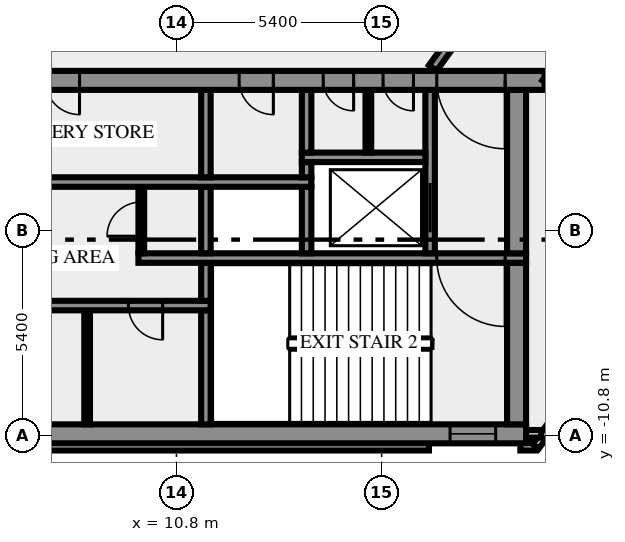
"""IFC4 building model, lengths in metres.
Left out: names, types, materials, properties, quantities, classifications, styles, units other than length and angle.
Written with IfcOpenShell. Run it as: python <this file> out.ifc"""

import sys

from ifc_helpers import new_model, si_unit, direction, frame, frame_2d, origin, place, context, subcontext, project, spatial, rectangle, extrude, element, fill, save


model = new_model("IFC4")
c1 = context("Model", 3, precision=1e-05, world=origin(), true_north=direction((0.0, 1.0)))
c2 = subcontext(c1, "Body", "Model", "MODEL_VIEW")
j1 = project(units=[si_unit("LENGTHUNIT", "METRE"), si_unit("PLANEANGLEUNIT", "RADIAN")], contexts=[c1])
p1 = place(None, origin())
s1 = spatial("IfcSite", under=j1, at=p1, CompositionType="ELEMENT")
p2 = place(p1, origin())
s2 = spatial("IfcBuilding", under=s1, at=p2, CompositionType="ELEMENT")
p3 = place(p2, frame((0.0, 0.0, 311.0)))
s3 = spatial("IfcBuildingStorey", under=s2, at=p3, CompositionType="ELEMENT", Elevation=311.0)
p4 = place(p3, frame((-17.444, -11.088, 0.0), z_axis=(0.0, 0.0, 1.0), x_axis=(1.0, 0.0, 0.0)))
e1 = element("IfcWall", 1, at=p4, inside=s3, PredefinedType="SOLIDWALL", context=c2, shape_type="SweptSolid", body=[
    extrude(rectangle(XDim=34.888, YDim=0.2, at=frame_2d((17.444, 0.0))), origin(), (0.0, 0.0, 1.0), 3.65),
])
p5 = place(p3, frame((19.85, -11.088, 0.0), z_axis=(0.0, 0.0, 1.0), x_axis=(1.0, 0.0, 0.0)))
e2 = element("IfcWall", 2, at=p5, inside=s3, PredefinedType="SOLIDWALL", context=c2, shape_type="SweptSolid", body=[
    extrude(rectangle(XDim=0.406, YDim=0.2, at=frame_2d((0.203, 0.0))), origin(), (0.0, 0.0, 1.0), 3.65),
])
p6 = place(p3, frame((20.253, -11.083, 0.0), z_axis=(0.0, 0.0, 1.0), x_axis=(0.587766567315, 0.809030569476, 0.0)))
e3 = element("IfcWall", 3, at=p6, inside=s3, PredefinedType="SOLIDWALL", context=c2, shape_type="SweptSolid", body=[
    extrude(rectangle(XDim=2.688, YDim=0.2, at=frame_2d((1.344, 0.0))), origin(), (0.0, 0.0, 1.0), 3.65),
])
p7 = place(p3, frame((19.98, -10.75, 0.0), z_axis=(0.0, 0.0, 1.0), x_axis=(1.0, 0.0, 0.0)))
e4 = element("IfcWall", 4, at=p7, inside=s3, PredefinedType="SOLIDWALL", context=c2, shape_type="SweptSolid", body=[
    extrude(rectangle(XDim=0.417, YDim=0.2, at=frame_2d((0.208, 0.0))), origin(), (0.0, 0.0, 1.0), 3.65),
])
p8 = place(p3, frame((-20.0, -10.75, 0.0), z_axis=(0.0, 0.0, 1.0), x_axis=(1.0, 0.0, 0.0)))
e5 = element("IfcWall", 5, at=p8, inside=s3, PredefinedType="SHEAR", context=c2, shape_type="SweptSolid", body=[
    extrude(rectangle(XDim=40.0, YDim=0.5, at=frame_2d((20.0, 0.0))), origin(), (0.0, 0.0, 1.0), 3.65),
])
p9 = place(p8, frame((0.8, 0.0, 1.0)))
e6 = element("IfcOpeningElement", 6, at=p9, cuts=e5, PredefinedType="OPENING", context=c2, shape_type="SweptSolid", body=[
    extrude(rectangle(XDim=1.2, YDim=1.2, at=frame_2d((0.6, 0.6))), frame((0.0, 0.26, 0.0), z_axis=(0.0, -1.0, 0.0), x_axis=(1.0, 0.0, 0.0)), (0.0, 0.0, 1.0), 0.52),
])
p10 = place(p8, frame((38.0, 0.0, 1.0)))
e7 = element("IfcOpeningElement", 7, at=p10, cuts=e5, PredefinedType="OPENING", context=c2, shape_type="SweptSolid", body=[
    extrude(rectangle(XDim=1.2, YDim=1.2, at=frame_2d((0.6, 0.6))), frame((0.0, 0.26, 0.0), z_axis=(0.0, -1.0, 0.0), x_axis=(1.0, 0.0, 0.0)), (0.0, 0.0, 1.0), 0.52),
])
p11 = place(p3, frame((8.45, -10.5, 0.0), z_axis=(0.0, 0.0, 1.0), x_axis=(0.0, 1.0, 0.0)))
e8 = element("IfcWall", 8, at=p11, inside=s3, PredefinedType="PARTITIONING", context=c2, shape_type="SweptSolid", body=[
    extrude(rectangle(XDim=3.0, YDim=0.15, at=frame_2d((1.5, 0.0))), origin(), (0.0, 0.0, 1.0), 3.65),
])
p12 = place(p3, frame((11.575, -10.5, 0.0), z_axis=(0.0, 0.0, 1.0), x_axis=(0.0, 1.0, 0.0)))
e9 = element("IfcWall", 9, at=p12, inside=s3, PredefinedType="SHEAR", context=c2, shape_type="SweptSolid", body=[
    extrude(rectangle(XDim=3.0, YDim=0.25, at=frame_2d((1.5, 0.0))), origin(), (0.0, 0.0, 1.0), 3.65),
])
p13 = place(p3, frame((19.75, -10.5, 0.0), z_axis=(0.0, 0.0, 1.0), x_axis=(0.0, 1.0, 0.0)))
e10 = element("IfcWall", 10, at=p13, inside=s3, PredefinedType="SHEAR", context=c2, shape_type="SweptSolid", body=[
    extrude(rectangle(XDim=4.25, YDim=0.5, at=frame_2d((2.125, 0.0))), origin(), (0.0, 0.0, 1.0), 3.65),
])
p14 = place(p3, frame((11.7, -7.375, 0.0), z_axis=(0.0, 0.0, 1.0), x_axis=(-1.0, 0.0, 0.0)))
e11 = element("IfcWall", 11, at=p14, inside=s3, PredefinedType="SHEAR", context=c2, shape_type="SweptSolid", body=[
    extrude(rectangle(XDim=23.4, YDim=0.25, at=frame_2d((11.7, 0.0))), origin(), (0.0, 0.0, 1.0), 3.65),
])
p15 = place(p14, frame((22.225, 0.0, 0.0)))
e12 = element("IfcOpeningElement", 12, at=p15, cuts=e11, PredefinedType="OPENING", context=c2, shape_type="SweptSolid", body=[
    extrude(rectangle(XDim=0.8, YDim=2.1, at=frame_2d((0.4, 1.05))), frame((0.0, 0.135, 0.0), z_axis=(0.0, -1.0, 0.0), x_axis=(1.0, 0.0, 0.0)), (0.0, 0.0, 1.0), 0.27),
])
p16 = place(p14, frame((20.2, 0.0, 0.0)))
e13 = element("IfcOpeningElement", 13, at=p16, cuts=e11, PredefinedType="OPENING", context=c2, shape_type="SweptSolid", body=[
    extrude(rectangle(XDim=1.1, YDim=2.1, at=frame_2d((0.55, 1.05))), frame((0.0, 0.135, 0.0), z_axis=(0.0, -1.0, 0.0), x_axis=(1.0, 0.0, 0.0)), (0.0, 0.0, 1.0), 0.27),
])
p17 = place(p14, frame((17.7, 0.0, 0.0)))
e14 = element("IfcOpeningElement", 14, at=p17, cuts=e11, PredefinedType="OPENING", context=c2, shape_type="SweptSolid", body=[
    extrude(rectangle(XDim=1.1, YDim=2.1, at=frame_2d((0.55, 1.05))), frame((0.0, 0.135, 0.0), z_axis=(0.0, -1.0, 0.0), x_axis=(1.0, 0.0, 0.0)), (0.0, 0.0, 1.0), 0.27),
])
p18 = place(p14, frame((15.975, 0.0, 0.0)))
e15 = element("IfcOpeningElement", 15, at=p18, cuts=e11, PredefinedType="OPENING", context=c2, shape_type="SweptSolid", body=[
    extrude(rectangle(XDim=0.8, YDim=2.1, at=frame_2d((0.4, 1.05))), frame((0.0, 0.135, 0.0), z_axis=(0.0, -1.0, 0.0), x_axis=(1.0, 0.0, 0.0)), (0.0, 0.0, 1.0), 0.27),
])
p19 = place(p14, frame((14.65, 0.0, 0.0)))
e16 = element("IfcOpeningElement", 16, at=p19, cuts=e11, PredefinedType="OPENING", context=c2, shape_type="SweptSolid", body=[
    extrude(rectangle(XDim=0.8, YDim=2.1, at=frame_2d((0.4, 1.05))), frame((0.0, 0.135, 0.0), z_axis=(0.0, -1.0, 0.0), x_axis=(1.0, 0.0, 0.0)), (0.0, 0.0, 1.0), 0.27),
])
p20 = place(p14, frame((12.8, 0.0, 0.0)))
e17 = element("IfcOpeningElement", 17, at=p20, cuts=e11, PredefinedType="OPENING", context=c2, shape_type="SweptSolid", body=[
    extrude(rectangle(XDim=0.9, YDim=2.1, at=frame_2d((0.45, 1.05))), frame((0.0, 0.135, 0.0), z_axis=(0.0, -1.0, 0.0), x_axis=(1.0, 0.0, 0.0)), (0.0, 0.0, 1.0), 0.27),
])
p21 = place(p14, frame((10.7, 0.0, 0.0)))
e18 = element("IfcOpeningElement", 18, at=p21, cuts=e11, PredefinedType="OPENING", context=c2, shape_type="SweptSolid", body=[
    extrude(rectangle(XDim=0.9, YDim=2.1, at=frame_2d((0.45, 1.05))), frame((0.0, 0.135, 0.0), z_axis=(0.0, -1.0, 0.0), x_axis=(1.0, 0.0, 0.0)), (0.0, 0.0, 1.0), 0.27),
])
p22 = place(p14, frame((6.237, 0.0, 0.0)))
e19 = element("IfcOpeningElement", 19, at=p22, cuts=e11, PredefinedType="OPENING", context=c2, shape_type="SweptSolid", body=[
    extrude(rectangle(XDim=0.9, YDim=2.1, at=frame_2d((0.45, 1.05))), frame((0.0, 0.135, 0.0), z_axis=(0.0, -1.0, 0.0), x_axis=(1.0, 0.0, 0.0)), (0.0, 0.0, 1.0), 0.27),
])
p23 = place(p14, frame((1.263, 0.0, 0.0)))
e20 = element("IfcOpeningElement", 20, at=p23, cuts=e11, PredefinedType="OPENING", context=c2, shape_type="SweptSolid", body=[
    extrude(rectangle(XDim=0.9, YDim=2.1, at=frame_2d((0.45, 1.05))), frame((0.0, 0.135, 0.0), z_axis=(0.0, -1.0, 0.0), x_axis=(1.0, 0.0, 0.0)), (0.0, 0.0, 1.0), 0.27),
])
p24 = place(p3, frame((11.575, -7.25, 0.0), z_axis=(0.0, 0.0, 1.0), x_axis=(0.0, 1.0, 0.0)))
e21 = element("IfcWall", 21, at=p24, inside=s3, PredefinedType="SHEAR", context=c2, shape_type="SweptSolid", body=[
    extrude(rectangle(XDim=1.0, YDim=0.25, at=frame_2d((0.5, 0.0))), origin(), (0.0, 0.0, 1.0), 3.65),
])
p25 = place(p3, frame((20.0, -6.125, 0.0), z_axis=(0.0, 0.0, 1.0), x_axis=(-1.0, 0.0, 0.0)))
e22 = element("IfcWall", 22, at=p25, inside=s3, PredefinedType="SHEAR", context=c2, shape_type="SweptSolid", body=[
    extrude(rectangle(XDim=10.2, YDim=0.25, at=frame_2d((5.1, 0.0))), origin(), (0.0, 0.0, 1.0), 3.65),
])
p26 = place(p25, frame((0.55, 0.0, 0.0)))
e23 = element("IfcOpeningElement", 23, at=p26, cuts=e22, PredefinedType="OPENING", context=c2, shape_type="SweptSolid", body=[
    extrude(rectangle(XDim=1.8, YDim=2.1, at=frame_2d((0.9, 1.05))), frame((0.0, 0.135, 0.0), z_axis=(0.0, -1.0, 0.0), x_axis=(1.0, 0.0, 0.0)), (0.0, 0.0, 1.0), 0.27),
])
p27 = place(p3, frame((9.875, -6.0, 0.0), z_axis=(0.0, 0.0, 1.0), x_axis=(0.0, 1.0, 0.0)))
e24 = element("IfcWall", 24, at=p27, inside=s3, PredefinedType="PARTITIONING", context=c2, shape_type="SweptSolid", body=[
    extrude(rectangle(XDim=1.75, YDim=0.15, at=frame_2d((0.875, 0.0))), origin(), (0.0, 0.0, 1.0), 3.65),
])
p28 = place(p27, frame((0.45, 0.0, 0.0)))
e25 = element("IfcOpeningElement", 25, at=p28, cuts=e24, PredefinedType="OPENING", context=c2, shape_type="SweptSolid", body=[
    extrude(rectangle(XDim=0.9, YDim=2.1, at=frame_2d((0.45, 1.05))), frame((0.0, 0.085, 0.0), z_axis=(0.0, -1.0, 0.0), x_axis=(1.0, 0.0, 0.0)), (0.0, 0.0, 1.0), 0.17),
])
for number, where, z_axis, x_axis in (
    (26, (11.575, -6.0, 0.0), (0.0, 0.0, 1.0), (0.0, 1.0, 0.0)),
    (27, (14.225, -6.0, 0.0), (0.0, 0.0, 1.0), (0.0, 1.0, 0.0)),
):
    element("IfcWall", number, at=place(p3, frame(where, z_axis=z_axis, x_axis=x_axis)), inside=s3, PredefinedType="SHEAR", context=c2, shape_type="SweptSolid", body=[
        extrude(rectangle(XDim=1.75, YDim=0.25, at=frame_2d((0.875, 0.0))), origin(), (0.0, 0.0, 1.0), 3.65),
    ])
p29 = place(p3, frame((17.475, -6.0, 0.0), z_axis=(0.0, 0.0, 1.0), x_axis=(0.0, 1.0, 0.0)))
e28 = element("IfcWall", 28, at=p29, inside=s3, PredefinedType="SHEAR", context=c2, shape_type="SweptSolid", body=[
    extrude(rectangle(XDim=4.3, YDim=0.25, at=frame_2d((2.15, 0.0))), origin(), (0.0, 0.0, 1.0), 3.65),
])
p30 = place(p29, frame((0.55, 0.0, 0.0)))
e29 = element("IfcOpeningElement", 29, at=p30, cuts=e28, PredefinedType="OPENING", context=c2, shape_type="SweptSolid", body=[
    extrude(rectangle(XDim=1.3, YDim=2.1, at=frame_2d((0.65, 1.05))), frame((0.0, 0.135, 0.0), z_axis=(0.0, -1.0, 0.0), x_axis=(1.0, 0.0, 0.0)), (0.0, 0.0, 1.0), 0.27),
])
p31 = place(p3, frame((19.75, -6.0, 0.0), z_axis=(0.0, 0.0, 1.0), x_axis=(0.0, 1.0, 0.0)))
e30 = element("IfcWall", 30, at=p31, inside=s3, PredefinedType="SHEAR", context=c2, shape_type="SweptSolid", body=[
    extrude(rectangle(XDim=4.3, YDim=0.5, at=frame_2d((2.15, 0.0))), origin(), (0.0, 0.0, 1.0), 3.65),
])
p32 = place(p3, frame((-0.6, -4.125, 0.0), z_axis=(0.0, 0.0, 1.0), x_axis=(1.0, 0.0, 0.0)))
e31 = element("IfcWall", 31, at=p32, inside=s3, PredefinedType="SHEAR", context=c2, shape_type="SweptSolid", body=[
    extrude(rectangle(XDim=14.95, YDim=0.25, at=frame_2d((7.475, 0.0))), origin(), (0.0, 0.0, 1.0), 3.65),
])
p33 = place(p32, frame((2.75, 0.0, 0.0)))
e32 = element("IfcOpeningElement", 32, at=p33, cuts=e31, PredefinedType="OPENING", context=c2, shape_type="SweptSolid", body=[
    extrude(rectangle(XDim=1.3, YDim=2.1, at=frame_2d((0.65, 1.05))), frame((0.0, 0.135, 0.0), z_axis=(0.0, -1.0, 0.0), x_axis=(1.0, 0.0, 0.0)), (0.0, 0.0, 1.0), 0.27),
])
p34 = place(p3, frame((11.575, -4.0, 0.0), z_axis=(0.0, 0.0, 1.0), x_axis=(0.0, 1.0, 0.0)))
e33 = element("IfcWall", 33, at=p34, inside=s3, PredefinedType="SHEAR", context=c2, shape_type="SweptSolid", body=[
    extrude(rectangle(XDim=2.3, YDim=0.25, at=frame_2d((1.15, 0.0))), origin(), (0.0, 0.0, 1.0), 3.65),
])
p35 = place(p3, frame((14.225, -4.0, 0.0), z_axis=(0.0, 0.0, 1.0), x_axis=(0.0, 1.0, 0.0)))
e34 = element("IfcWall", 34, at=p35, inside=s3, PredefinedType="SHEAR", context=c2, shape_type="SweptSolid", body=[
    extrude(rectangle(XDim=0.4, YDim=0.25, at=frame_2d((0.2, 0.0))), origin(), (0.0, 0.0, 1.0), 3.65),
])
p36 = place(p3, frame((14.1, -3.475, 0.0), z_axis=(0.0, 0.0, 1.0), x_axis=(1.0, 0.0, 0.0)))
e35 = element("IfcWall", 35, at=p36, inside=s3, PredefinedType="SHEAR", context=c2, shape_type="SweptSolid", body=[
    extrude(rectangle(XDim=3.25, YDim=0.25, at=frame_2d((1.625, 0.0))), origin(), (0.0, 0.0, 1.0), 3.65),
])
p37 = place(p3, frame((14.225, -3.35, 0.0), z_axis=(0.0, 0.0, 1.0), x_axis=(0.0, 1.0, 0.0)))
e36 = element("IfcWall", 36, at=p37, inside=s3, PredefinedType="SHEAR", context=c2, shape_type="SweptSolid", body=[
    extrude(rectangle(XDim=1.65, YDim=0.25, at=frame_2d((0.825, 0.0))), origin(), (0.0, 0.0, 1.0), 3.65),
])
p38 = place(p3, frame((15.85, -3.35, 0.0), z_axis=(0.0, 0.0, 1.0), x_axis=(0.0, 1.0, 0.0)))
e37 = element("IfcWall", 37, at=p38, inside=s3, PredefinedType="PARTITIONING", context=c2, shape_type="SweptSolid", body=[
    extrude(rectangle(XDim=1.65, YDim=0.15, at=frame_2d((0.825, 0.0))), origin(), (0.0, 0.0, 1.0), 3.65),
])
p39 = place(p3, frame((20.49, -1.45, 0.0), z_axis=(0.0, 0.0, 1.0), x_axis=(-1.0, 0.0, 0.0)))
e38 = element("IfcWall", 38, at=p39, inside=s3, PredefinedType="SHEAR", context=c2, shape_type="SweptSolid", body=[
    extrude(rectangle(XDim=40.98, YDim=0.5, at=frame_2d((20.49, 0.0))), origin(), (0.0, 0.0, 1.0), 3.65),
])
p40 = place(p39, frame((38.14, 0.0, 0.0)))
e39 = element("IfcOpeningElement", 39, at=p40, cuts=e38, PredefinedType="OPENING", context=c2, shape_type="SweptSolid", body=[
    extrude(rectangle(XDim=1.8, YDim=2.1, at=frame_2d((0.9, 1.05))), frame((0.0, 0.26, 0.0), z_axis=(0.0, -1.0, 0.0), x_axis=(1.0, 0.0, 0.0)), (0.0, 0.0, 1.0), 0.52),
])
p41 = place(p39, frame((35.89, 0.0, 0.0)))
e40 = element("IfcOpeningElement", 40, at=p41, cuts=e38, PredefinedType="OPENING", context=c2, shape_type="SweptSolid", body=[
    extrude(rectangle(XDim=0.9, YDim=2.1, at=frame_2d((0.45, 1.05))), frame((0.0, 0.26, 0.0), z_axis=(0.0, -1.0, 0.0), x_axis=(1.0, 0.0, 0.0)), (0.0, 0.0, 1.0), 0.52),
])
p42 = place(p39, frame((32.94, 0.0, 0.0)))
e41 = element("IfcOpeningElement", 41, at=p42, cuts=e38, PredefinedType="OPENING", context=c2, shape_type="SweptSolid", body=[
    extrude(rectangle(XDim=0.9, YDim=2.1, at=frame_2d((0.45, 1.05))), frame((0.0, 0.26, 0.0), z_axis=(0.0, -1.0, 0.0), x_axis=(1.0, 0.0, 0.0)), (0.0, 0.0, 1.0), 0.52),
])
p43 = place(p39, frame((31.015, 0.0, 0.0)))
e42 = element("IfcOpeningElement", 42, at=p43, cuts=e38, PredefinedType="OPENING", context=c2, shape_type="SweptSolid", body=[
    extrude(rectangle(XDim=0.8, YDim=2.1, at=frame_2d((0.4, 1.05))), frame((0.0, 0.26, 0.0), z_axis=(0.0, -1.0, 0.0), x_axis=(1.0, 0.0, 0.0)), (0.0, 0.0, 1.0), 0.52),
])
p44 = place(p39, frame((24.765, 0.0, 0.0)))
e43 = element("IfcOpeningElement", 43, at=p44, cuts=e38, PredefinedType="OPENING", context=c2, shape_type="SweptSolid", body=[
    extrude(rectangle(XDim=0.8, YDim=2.1, at=frame_2d((0.4, 1.05))), frame((0.0, 0.26, 0.0), z_axis=(0.0, -1.0, 0.0), x_axis=(1.0, 0.0, 0.0)), (0.0, 0.0, 1.0), 0.52),
])
p45 = place(p39, frame((21.765, 0.0, 0.0)))
e44 = element("IfcOpeningElement", 44, at=p45, cuts=e38, PredefinedType="OPENING", context=c2, shape_type="SweptSolid", body=[
    extrude(rectangle(XDim=2.0, YDim=2.1, at=frame_2d((1.0, 1.05))), frame((0.0, 0.26, 0.0), z_axis=(0.0, -1.0, 0.0), x_axis=(1.0, 0.0, 0.0)), (0.0, 0.0, 1.0), 0.52),
])
p46 = place(p39, frame((12.24, 0.0, 0.0)))
e45 = element("IfcOpeningElement", 45, at=p46, cuts=e38, PredefinedType="OPENING", context=c2, shape_type="SweptSolid", body=[
    extrude(rectangle(XDim=0.9, YDim=2.1, at=frame_2d((0.45, 1.05))), frame((0.0, 0.26, 0.0), z_axis=(0.0, -1.0, 0.0), x_axis=(1.0, 0.0, 0.0)), (0.0, 0.0, 1.0), 0.52),
])
p47 = place(p39, frame((7.14, 0.0, 0.0)))
e46 = element("IfcOpeningElement", 46, at=p47, cuts=e38, PredefinedType="OPENING", context=c2, shape_type="SweptSolid", body=[
    extrude(rectangle(XDim=0.9, YDim=2.1, at=frame_2d((0.45, 1.05))), frame((0.0, 0.26, 0.0), z_axis=(0.0, -1.0, 0.0), x_axis=(1.0, 0.0, 0.0)), (0.0, 0.0, 1.0), 0.52),
])
p48 = place(p39, frame((5.028, 0.0, 0.0)))
e47 = element("IfcOpeningElement", 47, at=p48, cuts=e38, PredefinedType="OPENING", context=c2, shape_type="SweptSolid", body=[
    extrude(rectangle(XDim=0.8, YDim=2.1, at=frame_2d((0.4, 1.05))), frame((0.0, 0.26, 0.0), z_axis=(0.0, -1.0, 0.0), x_axis=(1.0, 0.0, 0.0)), (0.0, 0.0, 1.0), 0.52),
])
p49 = place(p39, frame((3.452, 0.0, 0.0)))
e48 = element("IfcOpeningElement", 48, at=p49, cuts=e38, PredefinedType="OPENING", context=c2, shape_type="SweptSolid", body=[
    extrude(rectangle(XDim=0.8, YDim=2.1, at=frame_2d((0.4, 1.05))), frame((0.0, 0.26, 0.0), z_axis=(0.0, -1.0, 0.0), x_axis=(1.0, 0.0, 0.0)), (0.0, 0.0, 1.0), 0.52),
])
p50 = place(p39, frame((1.04, 0.0, 0.0)))
e49 = element("IfcOpeningElement", 49, at=p50, cuts=e38, PredefinedType="OPENING", context=c2, shape_type="SweptSolid", body=[
    extrude(rectangle(XDim=1.8, YDim=2.1, at=frame_2d((0.9, 1.05))), frame((0.0, 0.26, 0.0), z_axis=(0.0, -1.0, 0.0), x_axis=(1.0, 0.0, 0.0)), (0.0, 0.0, 1.0), 0.52),
])
p51 = place(p3, frame((17.545, -1.125, 0.0), z_axis=(0.0, 0.0, 1.0), x_axis=(0.587796810203, 0.809008596935, 0.0)))
e50 = element("IfcWall", 50, at=p51, inside=s3, PredefinedType="SOLIDWALL", context=c2, shape_type="SweptSolid", body=[
    extrude(rectangle(XDim=12.703, YDim=0.25, at=frame_2d((6.352, 0.0))), origin(), (0.0, 0.0, 1.0), 3.65),
])
p52 = place(p51, frame((11.329, 0.0, 0.0)))
e51 = element("IfcOpeningElement", 51, at=p52, cuts=e50, PredefinedType="OPENING", context=c2, shape_type="SweptSolid", body=[
    extrude(rectangle(XDim=0.9, YDim=2.1, at=frame_2d((0.45, 1.05))), frame((0.0, 0.135, 0.0), z_axis=(0.0, -1.0, 0.0), x_axis=(1.0, 0.0, 0.0)), (0.0, 0.0, 1.0), 0.27),
])
p53 = place(p3, frame((27.009, 7.392, 0.0), z_axis=(0.0, 0.0, 1.0), x_axis=(-0.587776457057, -0.809023384414, 0.0)))
e52 = element("IfcWall", 52, at=p53, inside=s3, PredefinedType="SOLIDWALL", context=c2, shape_type="SweptSolid", body=[
    extrude(rectangle(XDim=11.021, YDim=0.25, at=frame_2d((5.51, 0.0))), origin(), (0.0, 0.0, 1.0), 3.65),
])
p54 = place(p53, frame((9.588, 0.0, 0.0)))
e53 = element("IfcOpeningElement", 53, at=p54, cuts=e52, PredefinedType="OPENING", context=c2, shape_type="SweptSolid", body=[
    extrude(rectangle(XDim=0.9, YDim=2.1, at=frame_2d((0.45, 1.05))), frame((0.0, 0.135, 0.0), z_axis=(0.0, -1.0, 0.0), x_axis=(1.0, 0.0, 0.0)), (0.0, 0.0, 1.0), 0.27),
])
p55 = place(p10, origin())
e54 = element("IfcWindow", 54, at=p55, inside=s3, PartitioningType="SINGLE_PANEL", PredefinedType="WINDOW", context=c2, shape_type="SweptSolid", body=[
    extrude(rectangle(XDim=1.2, YDim=1.2, at=frame_2d((0.6, 0.6))), frame((0.0, 0.03, 0.0), z_axis=(0.0, -1.0, 0.0), x_axis=(1.0, 0.0, 0.0)), (0.0, 0.0, 1.0), 0.06),
])
fill(e7, e54)
p56 = place(p23, origin())
e55 = element("IfcDoor", 55, at=p56, inside=s3, OperationType="SINGLE_SWING_LEFT", PredefinedType="DOOR", context=c2, shape_type="SweptSolid", body=[
    extrude(rectangle(XDim=0.9, YDim=2.1, at=frame_2d((0.45, 1.05))), frame((0.0, 0.025, 0.0), z_axis=(0.0, -1.0, 0.0), x_axis=(1.0, 0.0, 0.0)), (0.0, 0.0, 1.0), 0.05),
])
fill(e20, e55)
p57 = place(p26, origin())
e56 = element("IfcDoor", 56, at=p57, inside=s3, OperationType="DOUBLE_DOOR_SINGLE_SWING", PredefinedType="DOOR", context=c2, shape_type="SweptSolid", body=[
    extrude(rectangle(XDim=1.8, YDim=2.1, at=frame_2d((0.9, 1.05))), frame((0.0, 0.025, 0.0), z_axis=(0.0, -1.0, 0.0), x_axis=(1.0, 0.0, 0.0)), (0.0, 0.0, 1.0), 0.05),
])
fill(e23, e56)
p58 = place(p28, origin())
e57 = element("IfcDoor", 57, at=p58, inside=s3, OperationType="SINGLE_SWING_RIGHT", PredefinedType="DOOR", context=c2, shape_type="SweptSolid", body=[
    extrude(rectangle(XDim=0.9, YDim=2.1, at=frame_2d((0.45, 1.05))), frame((0.0, 0.025, 0.0), z_axis=(0.0, -1.0, 0.0), x_axis=(1.0, 0.0, 0.0)), (0.0, 0.0, 1.0), 0.05),
])
fill(e25, e57)
p59 = place(p30, origin())
e58 = element("IfcDoor", 58, at=p59, inside=s3, OperationType="DOUBLE_DOOR_SLIDING", PredefinedType="DOOR", context=c2, shape_type="SweptSolid", body=[
    extrude(rectangle(XDim=1.3, YDim=2.1, at=frame_2d((0.65, 1.05))), frame((0.0, 0.025, 0.0), z_axis=(0.0, -1.0, 0.0), x_axis=(1.0, 0.0, 0.0)), (0.0, 0.0, 1.0), 0.05),
])
fill(e29, e58)
p60 = place(p46, origin())
e59 = element("IfcDoor", 59, at=p60, inside=s3, OperationType="SINGLE_SWING_LEFT", PredefinedType="DOOR", context=c2, shape_type="SweptSolid", body=[
    extrude(rectangle(XDim=0.9, YDim=2.1, at=frame_2d((0.45, 1.05))), frame((0.0, 0.025, 0.0), z_axis=(0.0, -1.0, 0.0), x_axis=(1.0, 0.0, 0.0)), (0.0, 0.0, 1.0), 0.05),
])
fill(e45, e59)
p61 = place(p47, origin())
e60 = element("IfcDoor", 60, at=p61, inside=s3, OperationType="SINGLE_SWING_LEFT", PredefinedType="DOOR", context=c2, shape_type="SweptSolid", body=[
    extrude(rectangle(XDim=0.9, YDim=2.1, at=frame_2d((0.45, 1.05))), frame((0.0, 0.025, 0.0), z_axis=(0.0, -1.0, 0.0), x_axis=(1.0, 0.0, 0.0)), (0.0, 0.0, 1.0), 0.05),
])
fill(e46, e60)
p62 = place(p48, origin())
e61 = element("IfcDoor", 61, at=p62, inside=s3, OperationType="SINGLE_SWING_LEFT", PredefinedType="DOOR", context=c2, shape_type="SweptSolid", body=[
    extrude(rectangle(XDim=0.8, YDim=2.1, at=frame_2d((0.4, 1.05))), frame((0.0, 0.025, 0.0), z_axis=(0.0, -1.0, 0.0), x_axis=(1.0, 0.0, 0.0)), (0.0, 0.0, 1.0), 0.05),
])
fill(e47, e61)
p63 = place(p49, origin())
e62 = element("IfcDoor", 62, at=p63, inside=s3, OperationType="SINGLE_SWING_LEFT", PredefinedType="DOOR", context=c2, shape_type="SweptSolid", body=[
    extrude(rectangle(XDim=0.8, YDim=2.1, at=frame_2d((0.4, 1.05))), frame((0.0, 0.025, 0.0), z_axis=(0.0, -1.0, 0.0), x_axis=(1.0, 0.0, 0.0)), (0.0, 0.0, 1.0), 0.05),
])
fill(e48, e62)
p64 = place(p50, origin())
e63 = element("IfcDoor", 63, at=p64, inside=s3, OperationType="DOUBLE_DOOR_SINGLE_SWING", PredefinedType="DOOR", context=c2, shape_type="SweptSolid", body=[
    extrude(rectangle(XDim=1.8, YDim=2.1, at=frame_2d((0.9, 1.05))), frame((0.0, 0.025, 0.0), z_axis=(0.0, -1.0, 0.0), x_axis=(1.0, 0.0, 0.0)), (0.0, 0.0, 1.0), 0.05),
])
fill(e49, e63)
save(model, sys.argv[1])
